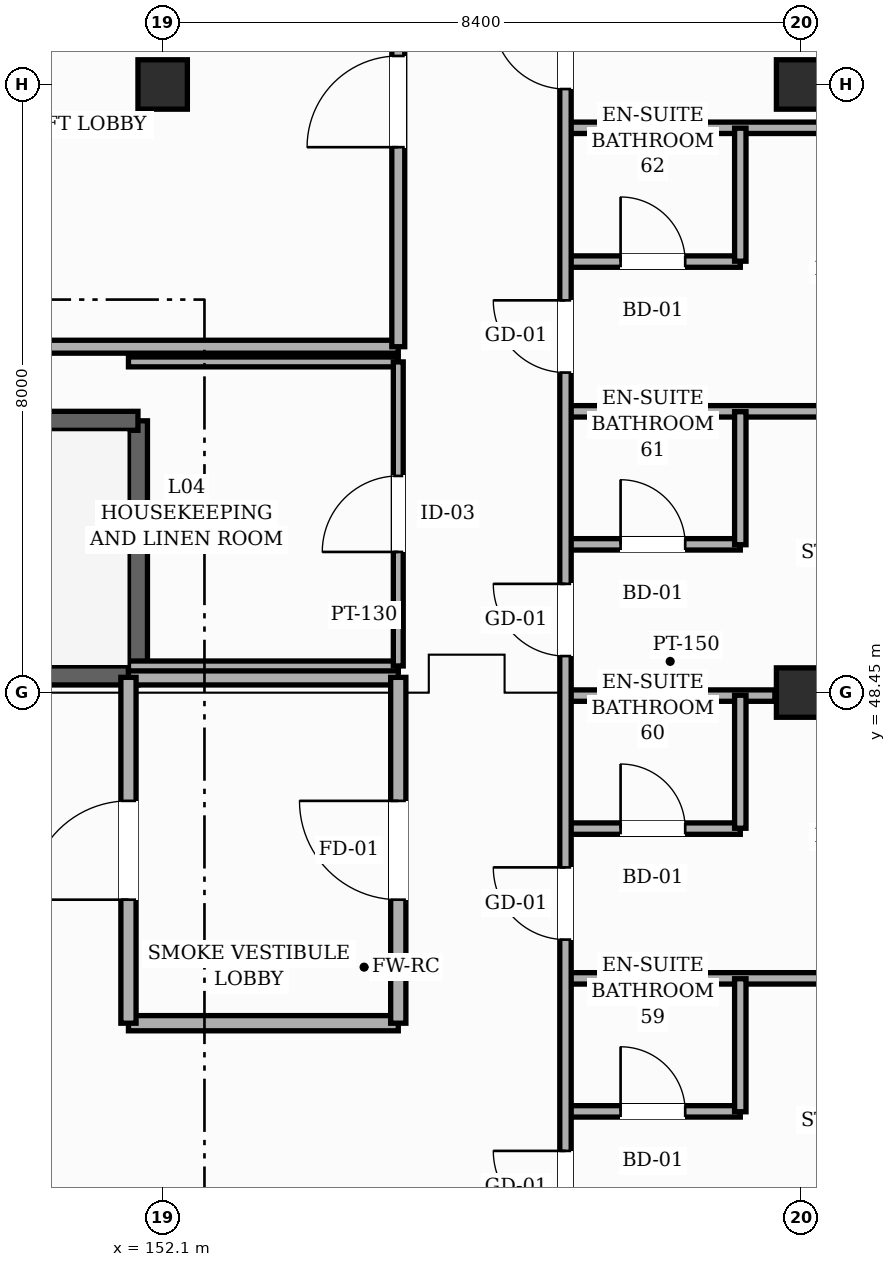
"""IFC4 building model, lengths in metres.
Left out: names, types, materials, properties, quantities, classifications, styles, units other than length and angle.
Written with IfcOpenShell. Run it as: python <this file> out.ifc"""

import sys

from ifc_helpers import new_model, si_unit, direction, frame, frame_2d, origin, origin_2d, place, context, subcontext, project, spatial, rectangle, hollow_rectangle, extrude, element, fill, save


model = new_model("IFC4")
c1 = context("Model", 3, precision=1e-05, world=origin(), true_north=direction((0.0, 1.0)))
c2 = subcontext(c1, "Body", "Model", "MODEL_VIEW")
j1 = project(units=[si_unit("LENGTHUNIT", "METRE"), si_unit("PLANEANGLEUNIT", "RADIAN")], contexts=[c1])
p1 = place(None, origin())
s1 = spatial("IfcSite", under=j1, at=p1, CompositionType="ELEMENT")
p2 = place(p1, origin())
s2 = spatial("IfcBuilding", under=s1, at=p2, CompositionType="ELEMENT")
p3 = place(p2, frame((0.0, 0.0, 19.8)))
s3 = spatial("IfcBuildingStorey", under=s2, at=p3, CompositionType="ELEMENT", Elevation=19.8)
for number, where, z_axis, x_axis in (
    (1, (152.1, 56.45, 0.0), (0.0, 0.0, 1.0), (1.0, 0.0, 0.0)),
    (2, (160.5, 48.45, 0.0), (0.0, 0.0, 1.0), (1.0, 0.0, 0.0)),
    (3, (160.5, 56.45, 0.0), (0.0, 0.0, 1.0), (1.0, 0.0, 0.0)),
):
    element("IfcColumn", number, at=place(p3, frame(where, z_axis=z_axis, x_axis=x_axis)), inside=s3, PredefinedType="COLUMN", context=c2, shape_type="SweptSolid", body=[
        extrude(hollow_rectangle(XDim=0.65, YDim=0.65, WallThickness=0.025, InnerFilletRadius=0.025, OuterFilletRadius=0.05, at=origin_2d()), origin(), (0.0, 0.0, 1.0), 4.8),
    ])
p4 = place(p3, frame((151.775, 52.025, 0.0), z_axis=(0.0, 0.0, 1.0), x_axis=(0.0, -1.0, 0.0)))
e4 = element("IfcWall", 4, at=p4, inside=s3, PredefinedType="SHEAR", context=c2, shape_type="SweptSolid", body=[
    extrude(rectangle(XDim=3.35, YDim=0.25, at=frame_2d((1.675, 0.0))), origin(), (0.0, 0.0, 1.0), 4.58),
])
p5 = place(p3, frame((151.775, 48.675, 0.0), z_axis=(0.0, 0.0, 1.0), x_axis=(-1.0, 0.0, 0.0)))
e5 = element("IfcWall", 5, at=p5, inside=s3, PredefinedType="SHEAR", context=c2, shape_type="SweptSolid", body=[
    extrude(rectangle(XDim=7.9, YDim=0.25, at=frame_2d((3.95, 0.0))), origin(), (0.0, 0.0, 1.0), 4.58),
])
p6 = place(p5, frame((6.075, 0.0, 0.0)))
e6 = element("IfcOpeningElement", 6, at=p6, cuts=e5, PredefinedType="OPENING", context=c2, shape_type="SweptSolid", body=[
    extrude(rectangle(XDim=1.3, YDim=2.2, at=frame_2d((0.65, 1.1))), frame((0.0, 0.135, 0.0), z_axis=(0.0, -1.0, 0.0), x_axis=(1.0, 0.0, 0.0)), (0.0, 0.0, 1.0), 0.27),
])
p7 = place(p3, frame((143.875, 52.025, 0.0), z_axis=(0.0, 0.0, 1.0), x_axis=(1.0, 0.0, 0.0)))
e7 = element("IfcWall", 7, at=p7, inside=s3, PredefinedType="SHEAR", context=c2, shape_type="SweptSolid", body=[
    extrude(rectangle(XDim=7.9, YDim=0.25, at=frame_2d((3.95, 0.0))), origin(), (0.0, 0.0, 1.0), 4.58),
])
p8 = place(p3, frame((157.4, 42.94, 0.0), z_axis=(0.0, 0.0, 1.0), x_axis=(1.0, 0.0, 0.0)))
e8 = element("IfcWall", 8, at=p8, inside=s3, PredefinedType="PARTITIONING", context=c2, shape_type="SweptSolid", body=[
    extrude(rectangle(XDim=2.3, YDim=0.15, at=frame_2d((1.15, 0.0))), origin(), (0.0, 0.0, 1.0), 4.565),
])
p9 = place(p8, frame((0.725, 0.0, 0.0)))
e9 = element("IfcOpeningElement", 9, at=p9, cuts=e8, PredefinedType="OPENING", context=c2, shape_type="SweptSolid", body=[
    extrude(rectangle(XDim=0.85, YDim=2.1, at=frame_2d((0.425, 1.05))), frame((0.0, 0.085, 0.0), z_axis=(0.0, -1.0, 0.0), x_axis=(1.0, 0.0, 0.0)), (0.0, 0.0, 1.0), 0.17),
])
p10 = place(p3, frame((151.65, 44.1, 0.0), z_axis=(0.0, 0.0, 1.0), x_axis=(1.0, 0.0, 0.0)))
e10 = element("IfcWall", 10, at=p10, inside=s3, PredefinedType="SOLIDWALL", context=c2, shape_type="SweptSolid", body=[
    extrude(rectangle(XDim=3.55, YDim=0.2, at=frame_2d((1.775, 0.0))), origin(), (0.0, 0.0, 1.0), 4.565),
])
p11 = place(p3, frame((157.4, 44.69, 0.0), z_axis=(0.0, 0.0, 1.0), x_axis=(1.0, 0.0, 0.0)))
e11 = element("IfcWall", 11, at=p11, inside=s3, PredefinedType="PARTITIONING", context=c2, shape_type="SweptSolid", body=[
    extrude(rectangle(XDim=9.8, YDim=0.15, at=frame_2d((4.9, 0.0))), origin(), (0.0, 0.0, 1.0), 4.255),
])
p12 = place(p3, frame((157.4, 46.66, 0.0), z_axis=(0.0, 0.0, 1.0), x_axis=(1.0, 0.0, 0.0)))
e12 = element("IfcWall", 12, at=p12, inside=s3, PredefinedType="PARTITIONING", context=c2, shape_type="SweptSolid", body=[
    extrude(rectangle(XDim=2.3, YDim=0.15, at=frame_2d((1.15, 0.0))), origin(), (0.0, 0.0, 1.0), 4.565),
])
p13 = place(p12, frame((0.725, 0.0, 0.0)))
e13 = element("IfcOpeningElement", 13, at=p13, cuts=e12, PredefinedType="OPENING", context=c2, shape_type="SweptSolid", body=[
    extrude(rectangle(XDim=0.85, YDim=2.1, at=frame_2d((0.425, 1.05))), frame((0.0, 0.085, 0.0), z_axis=(0.0, -1.0, 0.0), x_axis=(1.0, 0.0, 0.0)), (0.0, 0.0, 1.0), 0.17),
])
p14 = place(p3, frame((157.4, 48.41, 0.0), z_axis=(0.0, 0.0, 1.0), x_axis=(1.0, 0.0, 0.0)))
e14 = element("IfcWall", 14, at=p14, inside=s3, PredefinedType="PARTITIONING", context=c2, shape_type="SweptSolid", body=[
    extrude(rectangle(XDim=2.755, YDim=0.15, at=frame_2d((1.377, 0.0))), origin(), (0.0, 0.0, 1.0), 4.565),
])
p15 = place(p3, frame((151.65, 48.65, 0.0), z_axis=(0.0, 0.0, 1.0), x_axis=(1.0, 0.0, 0.0)))
e15 = element("IfcWall", 15, at=p15, inside=s3, PredefinedType="SOLIDWALL", context=c2, shape_type="SweptSolid", body=[
    extrude(rectangle(XDim=3.55, YDim=0.2, at=frame_2d((1.775, 0.0))), origin(), (0.0, 0.0, 1.0), 4.565),
])
p16 = place(p3, frame((151.65, 48.8, 0.0), z_axis=(0.0, 0.0, 1.0), x_axis=(1.0, 0.0, 0.0)))
e16 = element("IfcWall", 16, at=p16, inside=s3, PredefinedType="PARTITIONING", context=c2, shape_type="SweptSolid", body=[
    extrude(rectangle(XDim=3.55, YDim=0.13, at=frame_2d((1.775, 0.0))), origin(), (0.0, 0.0, 1.0), 4.565),
])
p17 = place(p3, frame((157.4, 50.4, 0.0), z_axis=(0.0, 0.0, 1.0), x_axis=(1.0, 0.0, 0.0)))
e17 = element("IfcWall", 17, at=p17, inside=s3, PredefinedType="PARTITIONING", context=c2, shape_type="SweptSolid", body=[
    extrude(rectangle(XDim=2.3, YDim=0.15, at=frame_2d((1.15, 0.0))), origin(), (0.0, 0.0, 1.0), 4.565),
])
p18 = place(p17, frame((0.725, 0.0, 0.0)))
e18 = element("IfcOpeningElement", 18, at=p18, cuts=e17, PredefinedType="OPENING", context=c2, shape_type="SweptSolid", body=[
    extrude(rectangle(XDim=0.85, YDim=2.1, at=frame_2d((0.425, 1.05))), frame((0.0, 0.085, 0.0), z_axis=(0.0, -1.0, 0.0), x_axis=(1.0, 0.0, 0.0)), (0.0, 0.0, 1.0), 0.17),
])
p19 = place(p3, frame((157.4, 52.15, 0.0), z_axis=(0.0, 0.0, 1.0), x_axis=(1.0, 0.0, 0.0)))
e19 = element("IfcWall", 19, at=p19, inside=s3, PredefinedType="PARTITIONING", context=c2, shape_type="SweptSolid", body=[
    extrude(rectangle(XDim=9.8, YDim=0.15, at=frame_2d((4.9, 0.0))), origin(), (0.0, 0.0, 1.0), 4.565),
])
p20 = place(p3, frame((151.65, 52.8, 0.0), z_axis=(0.0, 0.0, 1.0), x_axis=(1.0, 0.0, 0.0)))
e20 = element("IfcWall", 20, at=p20, inside=s3, PredefinedType="PARTITIONING", context=c2, shape_type="SweptSolid", body=[
    extrude(rectangle(XDim=3.55, YDim=0.13, at=frame_2d((1.775, 0.0))), origin(), (0.0, 0.0, 1.0), 4.565),
])
p21 = place(p3, frame((144.8, 53.0, 0.0), z_axis=(0.0, 0.0, 1.0), x_axis=(1.0, 0.0, 0.0)))
e21 = element("IfcWall", 21, at=p21, inside=s3, PredefinedType="PARTITIONING", context=c2, shape_type="SweptSolid", body=[
    extrude(rectangle(XDim=10.4, YDim=0.17, at=frame_2d((5.2, 0.0))), origin(), (0.0, 0.0, 1.0), 4.565),
])
p22 = place(p3, frame((157.4, 54.12, 0.0), z_axis=(0.0, 0.0, 1.0), x_axis=(1.0, 0.0, 0.0)))
e22 = element("IfcWall", 22, at=p22, inside=s3, PredefinedType="PARTITIONING", context=c2, shape_type="SweptSolid", body=[
    extrude(rectangle(XDim=2.3, YDim=0.15, at=frame_2d((1.15, 0.0))), origin(), (0.0, 0.0, 1.0), 4.565),
])
p23 = place(p22, frame((0.725, 0.0, 0.0)))
e23 = element("IfcOpeningElement", 23, at=p23, cuts=e22, PredefinedType="OPENING", context=c2, shape_type="SweptSolid", body=[
    extrude(rectangle(XDim=0.85, YDim=2.1, at=frame_2d((0.425, 1.05))), frame((0.0, 0.085, 0.0), z_axis=(0.0, -1.0, 0.0), x_axis=(1.0, 0.0, 0.0)), (0.0, 0.0, 1.0), 0.17),
])
p24 = place(p3, frame((157.4, 55.88, 0.0), z_axis=(0.0, 0.0, 1.0), x_axis=(1.0, 0.0, 0.0)))
e24 = element("IfcWall", 24, at=p24, inside=s3, PredefinedType="PARTITIONING", context=c2, shape_type="SweptSolid", body=[
    extrude(rectangle(XDim=9.8, YDim=0.15, at=frame_2d((4.9, 0.0))), origin(), (0.0, 0.0, 1.0), 4.565),
])
p25 = place(p3, frame((151.65, 44.1, 0.0), z_axis=(0.0, 0.0, 1.0), x_axis=(0.0, 1.0, 0.0)))
e25 = element("IfcWall", 25, at=p25, inside=s3, PredefinedType="SOLIDWALL", context=c2, shape_type="SweptSolid", body=[
    extrude(rectangle(XDim=4.55, YDim=0.2, at=frame_2d((2.275, 0.0))), origin(), (0.0, 0.0, 1.0), 4.565),
])
p26 = place(p25, frame((1.625, 0.0, 0.0)))
e26 = element("IfcOpeningElement", 26, at=p26, cuts=e25, PredefinedType="OPENING", context=c2, shape_type="SweptSolid", body=[
    extrude(rectangle(XDim=1.3, YDim=2.2, at=frame_2d((0.65, 1.1))), frame((0.0, 0.11, 0.0), z_axis=(0.0, -1.0, 0.0), x_axis=(1.0, 0.0, 0.0)), (0.0, 0.0, 1.0), 0.22),
])
p27 = place(p3, frame((155.2, 44.1, 0.0), z_axis=(0.0, 0.0, 1.0), x_axis=(0.0, 1.0, 0.0)))
e27 = element("IfcWall", 27, at=p27, inside=s3, PredefinedType="SOLIDWALL", context=c2, shape_type="SweptSolid", body=[
    extrude(rectangle(XDim=4.55, YDim=0.2, at=frame_2d((2.275, 0.0))), origin(), (0.0, 0.0, 1.0), 4.565),
])
p28 = place(p27, frame((1.625, 0.0, 0.0)))
e28 = element("IfcOpeningElement", 28, at=p28, cuts=e27, PredefinedType="OPENING", context=c2, shape_type="SweptSolid", body=[
    extrude(rectangle(XDim=1.3, YDim=2.2, at=frame_2d((0.65, 1.1))), frame((0.0, 0.11, 0.0), z_axis=(0.0, -1.0, 0.0), x_axis=(1.0, 0.0, 0.0)), (0.0, 0.0, 1.0), 0.22),
])
p29 = place(p3, frame((155.2, 48.8, 0.0), z_axis=(0.0, 0.0, 1.0), x_axis=(0.0, 1.0, 0.0)))
e29 = element("IfcWall", 29, at=p29, inside=s3, PredefinedType="PARTITIONING", context=c2, shape_type="SweptSolid", body=[
    extrude(rectangle(XDim=4.0, YDim=0.13, at=frame_2d((2.0, 0.0))), origin(), (0.0, 0.0, 1.0), 4.565),
])
p30 = place(p29, frame((1.5, 0.0, 0.0)))
e30 = element("IfcOpeningElement", 30, at=p30, cuts=e29, PredefinedType="OPENING", context=c2, shape_type="SweptSolid", body=[
    extrude(rectangle(XDim=1.0, YDim=2.18, at=frame_2d((0.5, 1.09))), frame((0.0, 0.075, 0.0), z_axis=(0.0, -1.0, 0.0), x_axis=(1.0, 0.0, 0.0)), (0.0, 0.0, 1.0), 0.15),
])
p31 = place(p3, frame((155.2, 53.0, 0.0), z_axis=(0.0, 0.0, 1.0), x_axis=(0.0, 1.0, 0.0)))
e31 = element("IfcWall", 31, at=p31, inside=s3, PredefinedType="PARTITIONING", context=c2, shape_type="SweptSolid", body=[
    extrude(rectangle(XDim=6.45, YDim=0.17, at=frame_2d((3.225, 0.0))), origin(), (0.0, 0.0, 1.0), 4.565),
])
p32 = place(p31, frame((2.625, 0.0, 0.0)))
e32 = element("IfcOpeningElement", 32, at=p32, cuts=e31, PredefinedType="OPENING", context=c2, shape_type="SweptSolid", body=[
    extrude(rectangle(XDim=1.2, YDim=2.2, at=frame_2d((0.6, 1.1))), frame((0.0, 0.095, 0.0), z_axis=(0.0, -1.0, 0.0), x_axis=(1.0, 0.0, 0.0)), (0.0, 0.0, 1.0), 0.19),
])
p33 = place(p3, frame((157.4, 22.3, 0.0), z_axis=(0.0, 0.0, 1.0), x_axis=(0.0, 1.0, 0.0)))
e33 = element("IfcWall", 33, at=p33, inside=s3, PredefinedType="PARTITIONING", context=c2, shape_type="SweptSolid", body=[
    extrude(rectangle(XDim=48.5, YDim=0.15, at=frame_2d((24.25, 0.0))), origin(), (0.0, 0.0, 1.0), 4.565),
])
p34 = place(p33, frame((0.515, 0.0, 0.0)))
e34 = element("IfcOpeningElement", 34, at=p34, cuts=e33, PredefinedType="OPENING", context=c2, shape_type="SweptSolid", body=[
    extrude(rectangle(XDim=0.95, YDim=2.15, at=frame_2d((0.475, 1.075))), frame((0.0, 0.085, 0.0), z_axis=(0.0, -1.0, 0.0), x_axis=(1.0, 0.0, 0.0)), (0.0, 0.0, 1.0), 0.17),
])
p35 = place(p33, frame((4.245, 0.0, 0.0)))
e35 = element("IfcOpeningElement", 35, at=p35, cuts=e33, PredefinedType="OPENING", context=c2, shape_type="SweptSolid", body=[
    extrude(rectangle(XDim=0.95, YDim=2.15, at=frame_2d((0.475, 1.075))), frame((0.0, 0.085, 0.0), z_axis=(0.0, -1.0, 0.0), x_axis=(1.0, 0.0, 0.0)), (0.0, 0.0, 1.0), 0.17),
])
p36 = place(p33, frame((7.975, 0.0, 0.0)))
e36 = element("IfcOpeningElement", 36, at=p36, cuts=e33, PredefinedType="OPENING", context=c2, shape_type="SweptSolid", body=[
    extrude(rectangle(XDim=0.95, YDim=2.15, at=frame_2d((0.475, 1.075))), frame((0.0, 0.085, 0.0), z_axis=(0.0, -1.0, 0.0), x_axis=(1.0, 0.0, 0.0)), (0.0, 0.0, 1.0), 0.17),
])
p37 = place(p33, frame((11.71, 0.0, 0.0)))
e37 = element("IfcOpeningElement", 37, at=p37, cuts=e33, PredefinedType="OPENING", context=c2, shape_type="SweptSolid", body=[
    extrude(rectangle(XDim=0.95, YDim=2.15, at=frame_2d((0.475, 1.075))), frame((0.0, 0.085, 0.0), z_axis=(0.0, -1.0, 0.0), x_axis=(1.0, 0.0, 0.0)), (0.0, 0.0, 1.0), 0.17),
])
p38 = place(p33, frame((15.44, 0.0, 0.0)))
e38 = element("IfcOpeningElement", 38, at=p38, cuts=e33, PredefinedType="OPENING", context=c2, shape_type="SweptSolid", body=[
    extrude(rectangle(XDim=0.95, YDim=2.15, at=frame_2d((0.475, 1.075))), frame((0.0, 0.085, 0.0), z_axis=(0.0, -1.0, 0.0), x_axis=(1.0, 0.0, 0.0)), (0.0, 0.0, 1.0), 0.17),
])
p39 = place(p33, frame((19.17, 0.0, 0.0)))
e39 = element("IfcOpeningElement", 39, at=p39, cuts=e33, PredefinedType="OPENING", context=c2, shape_type="SweptSolid", body=[
    extrude(rectangle(XDim=0.95, YDim=2.15, at=frame_2d((0.475, 1.075))), frame((0.0, 0.085, 0.0), z_axis=(0.0, -1.0, 0.0), x_axis=(1.0, 0.0, 0.0)), (0.0, 0.0, 1.0), 0.17),
])
p40 = place(p33, frame((22.9, 0.0, 0.0)))
e40 = element("IfcOpeningElement", 40, at=p40, cuts=e33, PredefinedType="OPENING", context=c2, shape_type="SweptSolid", body=[
    extrude(rectangle(XDim=0.95, YDim=2.15, at=frame_2d((0.475, 1.075))), frame((0.0, 0.085, 0.0), z_axis=(0.0, -1.0, 0.0), x_axis=(1.0, 0.0, 0.0)), (0.0, 0.0, 1.0), 0.17),
])
p41 = place(p33, frame((26.63, 0.0, 0.0)))
e41 = element("IfcOpeningElement", 41, at=p41, cuts=e33, PredefinedType="OPENING", context=c2, shape_type="SweptSolid", body=[
    extrude(rectangle(XDim=0.95, YDim=2.15, at=frame_2d((0.475, 1.075))), frame((0.0, 0.085, 0.0), z_axis=(0.0, -1.0, 0.0), x_axis=(1.0, 0.0, 0.0)), (0.0, 0.0, 1.0), 0.17),
])
p42 = place(p33, frame((30.36, 0.0, 0.0)))
e42 = element("IfcOpeningElement", 42, at=p42, cuts=e33, PredefinedType="OPENING", context=c2, shape_type="SweptSolid", body=[
    extrude(rectangle(XDim=0.95, YDim=2.15, at=frame_2d((0.475, 1.075))), frame((0.0, 0.085, 0.0), z_axis=(0.0, -1.0, 0.0), x_axis=(1.0, 0.0, 0.0)), (0.0, 0.0, 1.0), 0.17),
])
p43 = place(p33, frame((34.09, 0.0, 0.0)))
e43 = element("IfcOpeningElement", 43, at=p43, cuts=e33, PredefinedType="OPENING", context=c2, shape_type="SweptSolid", body=[
    extrude(rectangle(XDim=0.95, YDim=2.15, at=frame_2d((0.475, 1.075))), frame((0.0, 0.085, 0.0), z_axis=(0.0, -1.0, 0.0), x_axis=(1.0, 0.0, 0.0)), (0.0, 0.0, 1.0), 0.17),
])
p44 = place(p33, frame((37.825, 0.0, 0.0)))
e44 = element("IfcOpeningElement", 44, at=p44, cuts=e33, PredefinedType="OPENING", context=c2, shape_type="SweptSolid", body=[
    extrude(rectangle(XDim=0.95, YDim=2.15, at=frame_2d((0.475, 1.075))), frame((0.0, 0.085, 0.0), z_axis=(0.0, -1.0, 0.0), x_axis=(1.0, 0.0, 0.0)), (0.0, 0.0, 1.0), 0.17),
])
p45 = place(p33, frame((41.555, 0.0, 0.0)))
e45 = element("IfcOpeningElement", 45, at=p45, cuts=e33, PredefinedType="OPENING", context=c2, shape_type="SweptSolid", body=[
    extrude(rectangle(XDim=0.95, YDim=2.15, at=frame_2d((0.475, 1.075))), frame((0.0, 0.085, 0.0), z_axis=(0.0, -1.0, 0.0), x_axis=(1.0, 0.0, 0.0)), (0.0, 0.0, 1.0), 0.17),
])
p46 = place(p33, frame((45.285, 0.0, 0.0)))
e46 = element("IfcOpeningElement", 46, at=p46, cuts=e33, PredefinedType="OPENING", context=c2, shape_type="SweptSolid", body=[
    extrude(rectangle(XDim=0.95, YDim=2.15, at=frame_2d((0.475, 1.075))), frame((0.0, 0.085, 0.0), z_axis=(0.0, -1.0, 0.0), x_axis=(1.0, 0.0, 0.0)), (0.0, 0.0, 1.0), 0.17),
])
for number, where, z_axis, x_axis in (
    (47, (159.7, 42.935, 0.0), (0.0, 0.0, 1.0), (0.0, 1.0, 0.0)),
    (48, (159.7, 46.665, 0.0), (0.0, 0.0, 1.0), (0.0, 1.0, 0.0)),
    (49, (159.7, 50.395, 0.0), (0.0, 0.0, 1.0), (0.0, 1.0, 0.0)),
    (50, (159.7, 54.125, 0.0), (0.0, 0.0, 1.0), (0.0, 1.0, 0.0)),
):
    element("IfcWall", number, at=place(p3, frame(where, z_axis=z_axis, x_axis=x_axis)), inside=s3, PredefinedType="PARTITIONING", context=c2, shape_type="SweptSolid", body=[
        extrude(rectangle(XDim=1.75, YDim=0.15, at=frame_2d((0.875, 0.0))), origin(), (0.0, 0.0, 1.0), 4.565),
    ])
p47 = place(p26, origin())
e51 = element("IfcDoor", 51, at=p47, inside=s3, OperationType="SINGLE_SWING_LEFT", PredefinedType="DOOR", context=c2, shape_type="SweptSolid", body=[
    extrude(rectangle(XDim=1.3, YDim=2.2, at=frame_2d((0.65, 1.1))), frame((0.0, 0.025, 0.0), z_axis=(0.0, -1.0, 0.0), x_axis=(1.0, 0.0, 0.0)), (0.0, 0.0, 1.0), 0.05),
])
fill(e26, e51)
p48 = place(p28, origin())
e52 = element("IfcDoor", 52, at=p48, inside=s3, OperationType="SINGLE_SWING_RIGHT", PredefinedType="DOOR", context=c2, shape_type="SweptSolid", body=[
    extrude(rectangle(XDim=1.3, YDim=2.2, at=frame_2d((0.65, 1.1))), frame((0.0, 0.025, 0.0), z_axis=(0.0, -1.0, 0.0), x_axis=(1.0, 0.0, 0.0)), (0.0, 0.0, 1.0), 0.05),
])
fill(e28, e52)
p49 = place(p32, origin())
e53 = element("IfcDoor", 53, at=p49, inside=s3, OperationType="SINGLE_SWING_LEFT", PredefinedType="DOOR", context=c2, shape_type="SweptSolid", body=[
    extrude(rectangle(XDim=1.2, YDim=2.2, at=frame_2d((0.6, 1.1))), frame((0.0, 0.025, 0.0), z_axis=(0.0, -1.0, 0.0), x_axis=(1.0, 0.0, 0.0)), (0.0, 0.0, 1.0), 0.05),
])
fill(e32, e53)
p50 = place(p30, origin())
e54 = element("IfcDoor", 54, at=p50, inside=s3, OperationType="SINGLE_SWING_LEFT", PredefinedType="DOOR", context=c2, shape_type="SweptSolid", body=[
    extrude(rectangle(XDim=1.0, YDim=2.18, at=frame_2d((0.5, 1.09))), frame((0.0, 0.025, 0.0), z_axis=(0.0, -1.0, 0.0), x_axis=(1.0, 0.0, 0.0)), (0.0, 0.0, 1.0), 0.05),
])
fill(e30, e54)
p51 = place(p39, origin())
e55 = element("IfcDoor", 55, at=p51, inside=s3, OperationType="SINGLE_SWING_RIGHT", PredefinedType="DOOR", context=c2, shape_type="SweptSolid", body=[
    extrude(rectangle(XDim=0.95, YDim=2.15, at=frame_2d((0.475, 1.075))), frame((0.0, 0.025, 0.0), z_axis=(0.0, -1.0, 0.0), x_axis=(1.0, 0.0, 0.0)), (0.0, 0.0, 1.0), 0.05),
])
fill(e39, e55)
p52 = place(p9, origin())
e56 = element("IfcDoor", 56, at=p52, inside=s3, OperationType="SINGLE_SWING_LEFT", PredefinedType="DOOR", context=c2, shape_type="SweptSolid", body=[
    extrude(rectangle(XDim=0.85, YDim=2.1, at=frame_2d((0.425, 1.05))), frame((0.0, 0.025, 0.0), z_axis=(0.0, -1.0, 0.0), x_axis=(1.0, 0.0, 0.0)), (0.0, 0.0, 1.0), 0.05),
])
fill(e9, e56)
p53 = place(p40, origin())
e57 = element("IfcDoor", 57, at=p53, inside=s3, OperationType="SINGLE_SWING_RIGHT", PredefinedType="DOOR", context=c2, shape_type="SweptSolid", body=[
    extrude(rectangle(XDim=0.95, YDim=2.15, at=frame_2d((0.475, 1.075))), frame((0.0, 0.025, 0.0), z_axis=(0.0, -1.0, 0.0), x_axis=(1.0, 0.0, 0.0)), (0.0, 0.0, 1.0), 0.05),
])
fill(e40, e57)
p54 = place(p13, origin())
e58 = element("IfcDoor", 58, at=p54, inside=s3, OperationType="SINGLE_SWING_LEFT", PredefinedType="DOOR", context=c2, shape_type="SweptSolid", body=[
    extrude(rectangle(XDim=0.85, YDim=2.1, at=frame_2d((0.425, 1.05))), frame((0.0, 0.025, 0.0), z_axis=(0.0, -1.0, 0.0), x_axis=(1.0, 0.0, 0.0)), (0.0, 0.0, 1.0), 0.05),
])
fill(e13, e58)
p55 = place(p41, origin())
e59 = element("IfcDoor", 59, at=p55, inside=s3, OperationType="SINGLE_SWING_RIGHT", PredefinedType="DOOR", context=c2, shape_type="SweptSolid", body=[
    extrude(rectangle(XDim=0.95, YDim=2.15, at=frame_2d((0.475, 1.075))), frame((0.0, 0.025, 0.0), z_axis=(0.0, -1.0, 0.0), x_axis=(1.0, 0.0, 0.0)), (0.0, 0.0, 1.0), 0.05),
])
fill(e41, e59)
p56 = place(p18, origin())
e60 = element("IfcDoor", 60, at=p56, inside=s3, OperationType="SINGLE_SWING_LEFT", PredefinedType="DOOR", context=c2, shape_type="SweptSolid", body=[
    extrude(rectangle(XDim=0.85, YDim=2.1, at=frame_2d((0.425, 1.05))), frame((0.0, 0.025, 0.0), z_axis=(0.0, -1.0, 0.0), x_axis=(1.0, 0.0, 0.0)), (0.0, 0.0, 1.0), 0.05),
])
fill(e18, e60)
p57 = place(p42, origin())
e61 = element("IfcDoor", 61, at=p57, inside=s3, OperationType="SINGLE_SWING_RIGHT", PredefinedType="DOOR", context=c2, shape_type="SweptSolid", body=[
    extrude(rectangle(XDim=0.95, YDim=2.15, at=frame_2d((0.475, 1.075))), frame((0.0, 0.025, 0.0), z_axis=(0.0, -1.0, 0.0), x_axis=(1.0, 0.0, 0.0)), (0.0, 0.0, 1.0), 0.05),
])
fill(e42, e61)
p58 = place(p23, origin())
e62 = element("IfcDoor", 62, at=p58, inside=s3, OperationType="SINGLE_SWING_LEFT", PredefinedType="DOOR", context=c2, shape_type="SweptSolid", body=[
    extrude(rectangle(XDim=0.85, YDim=2.1, at=frame_2d((0.425, 1.05))), frame((0.0, 0.025, 0.0), z_axis=(0.0, -1.0, 0.0), x_axis=(1.0, 0.0, 0.0)), (0.0, 0.0, 1.0), 0.05),
])
fill(e23, e62)
p59 = place(p43, origin())
e63 = element("IfcDoor", 63, at=p59, inside=s3, OperationType="SINGLE_SWING_RIGHT", PredefinedType="DOOR", context=c2, shape_type="SweptSolid", body=[
    extrude(rectangle(XDim=0.95, YDim=2.15, at=frame_2d((0.475, 1.075))), frame((0.0, 0.025, 0.0), z_axis=(0.0, -1.0, 0.0), x_axis=(1.0, 0.0, 0.0)), (0.0, 0.0, 1.0), 0.05),
])
fill(e43, e63)
save(model, sys.argv[1])
